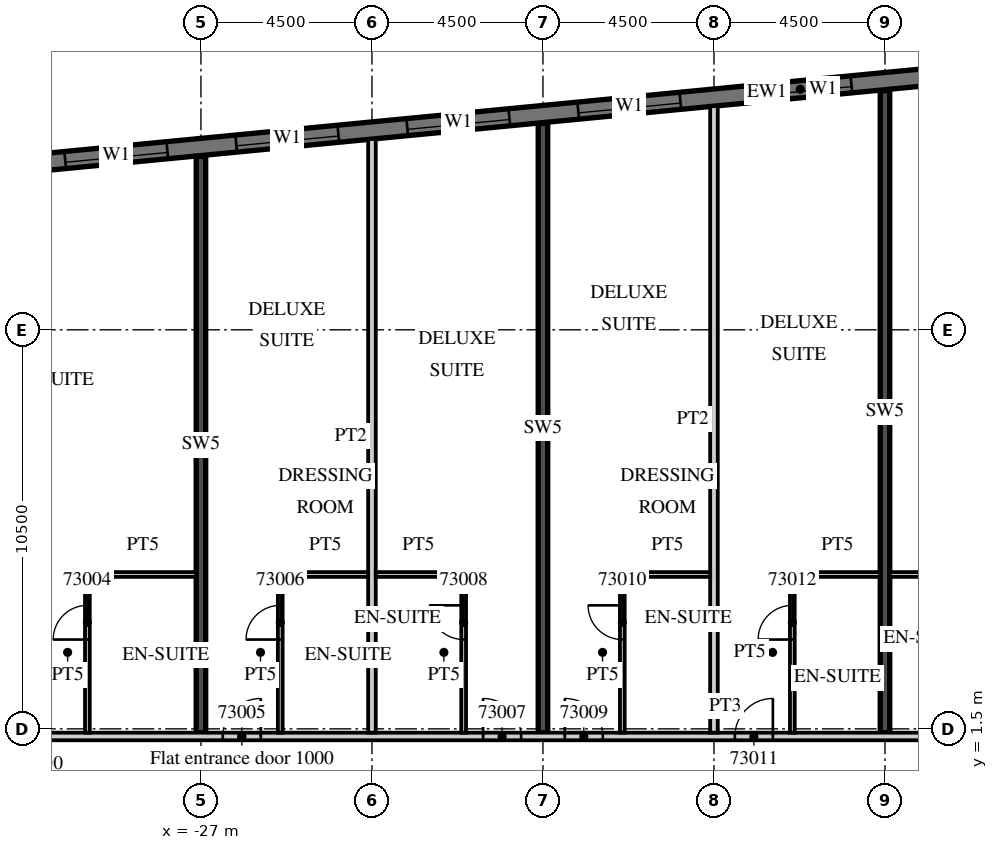
"""IFC4 building model, lengths in metres.
Left out: names, types, materials, properties, quantities, classifications, styles, units other than length and angle.
Written with IfcOpenShell. Run it as: python <this file> out.ifc"""

import sys

from ifc_helpers import new_model, si_unit, direction, frame, frame_2d, origin, place, context, subcontext, project, spatial, rectangle, extrude, element, fill, save


model = new_model("IFC4")
c1 = context("Model", 3, precision=1e-05, world=origin(), true_north=direction((0.0, 1.0)))
c2 = subcontext(c1, "Body", "Model", "MODEL_VIEW")
j1 = project(units=[si_unit("LENGTHUNIT", "METRE"), si_unit("PLANEANGLEUNIT", "RADIAN")], contexts=[c1])
p1 = place(None, origin())
s1 = spatial("IfcSite", under=j1, at=p1, CompositionType="ELEMENT")
p2 = place(p1, origin())
s2 = spatial("IfcBuilding", under=s1, at=p2, CompositionType="ELEMENT")
p3 = place(p2, frame((0.0, 0.0, 291.6)))
s3 = spatial("IfcBuildingStorey", under=s2, at=p3, CompositionType="ELEMENT", Elevation=291.6)
p4 = place(p3, frame((-27.0, 1.4, 0.0), z_axis=(0.0, 0.0, 1.0), x_axis=(0.0, 1.0, 0.0)))
e1 = element("IfcWall", 1, at=p4, inside=s3, PredefinedType="SHEAR", context=c2, shape_type="SweptSolid", body=[
    extrude(rectangle(XDim=15.163, YDim=0.25, at=frame_2d((7.582, 0.0))), origin(), (0.0, 0.0, 1.0), 3.3),
])
p5 = place(p3, frame((-18.0, 1.4, 0.0), z_axis=(0.0, 0.0, 1.0), x_axis=(0.0, 1.0, 0.0)))
e2 = element("IfcWall", 2, at=p5, inside=s3, PredefinedType="SHEAR", context=c2, shape_type="SweptSolid", body=[
    extrude(rectangle(XDim=16.03, YDim=0.25, at=frame_2d((8.015, 0.0))), origin(), (0.0, 0.0, 1.0), 3.3),
])
p6 = place(p3, frame((-9.0, 1.4, 0.0), z_axis=(0.0, 0.0, 1.0), x_axis=(0.0, 1.0, 0.0)))
e3 = element("IfcWall", 3, at=p6, inside=s3, PredefinedType="SHEAR", context=c2, shape_type="SweptSolid", body=[
    extrude(rectangle(XDim=16.896, YDim=0.25, at=frame_2d((8.448, 0.0))), origin(), (0.0, 0.0, 1.0), 3.3),
])
p7 = place(p3, frame((13.521, 20.713, 0.0), z_axis=(0.0, 0.0, 1.0), x_axis=(-0.995396277313, -0.095844932638, 0.0)))
e4 = element("IfcWall", 4, at=p7, inside=s3, PredefinedType="SOLIDWALL", context=c2, shape_type="SweptSolid", body=[
    extrude(rectangle(XDim=51.495, YDim=0.45, at=frame_2d((25.748, 0.0))), origin(), (0.0, 0.0, 1.0), 3.02),
])
p8 = place(p7, frame((0.91, 0.0, 0.45)))
e5 = element("IfcOpeningElement", 5, at=p8, cuts=e4, PredefinedType="OPENING", context=c2, shape_type="SweptSolid", body=[
    extrude(rectangle(XDim=2.7, YDim=2.25, at=frame_2d((1.35, 1.125))), frame((0.0, 0.235, 0.0), z_axis=(0.0, -1.0, 0.0), x_axis=(1.0, 0.0, 0.0)), (0.0, 0.0, 1.0), 0.47),
])
p9 = place(p7, frame((5.431, 0.0, 0.45)))
e6 = element("IfcOpeningElement", 6, at=p9, cuts=e4, PredefinedType="OPENING", context=c2, shape_type="SweptSolid", body=[
    extrude(rectangle(XDim=2.7, YDim=2.25, at=frame_2d((1.35, 1.125))), frame((0.0, 0.235, 0.0), z_axis=(0.0, -1.0, 0.0), x_axis=(1.0, 0.0, 0.0)), (0.0, 0.0, 1.0), 0.47),
])
p10 = place(p7, frame((9.952, 0.0, 0.45)))
e7 = element("IfcOpeningElement", 7, at=p10, cuts=e4, PredefinedType="OPENING", context=c2, shape_type="SweptSolid", body=[
    extrude(rectangle(XDim=2.7, YDim=2.25, at=frame_2d((1.35, 1.125))), frame((0.0, 0.235, 0.0), z_axis=(0.0, -1.0, 0.0), x_axis=(1.0, 0.0, 0.0)), (0.0, 0.0, 1.0), 0.47),
])
p11 = place(p7, frame((14.473, 0.0, 0.45)))
e8 = element("IfcOpeningElement", 8, at=p11, cuts=e4, PredefinedType="OPENING", context=c2, shape_type="SweptSolid", body=[
    extrude(rectangle(XDim=2.7, YDim=2.25, at=frame_2d((1.35, 1.125))), frame((0.0, 0.235, 0.0), z_axis=(0.0, -1.0, 0.0), x_axis=(1.0, 0.0, 0.0)), (0.0, 0.0, 1.0), 0.47),
])
p12 = place(p7, frame((18.994, 0.0, 0.45)))
e9 = element("IfcOpeningElement", 9, at=p12, cuts=e4, PredefinedType="OPENING", context=c2, shape_type="SweptSolid", body=[
    extrude(rectangle(XDim=2.7, YDim=2.25, at=frame_2d((1.35, 1.125))), frame((0.0, 0.235, 0.0), z_axis=(0.0, -1.0, 0.0), x_axis=(1.0, 0.0, 0.0)), (0.0, 0.0, 1.0), 0.47),
])
p13 = place(p7, frame((23.514, 0.0, 0.45)))
e10 = element("IfcOpeningElement", 10, at=p13, cuts=e4, PredefinedType="OPENING", context=c2, shape_type="SweptSolid", body=[
    extrude(rectangle(XDim=2.7, YDim=2.25, at=frame_2d((1.35, 1.125))), frame((0.0, 0.235, 0.0), z_axis=(0.0, -1.0, 0.0), x_axis=(1.0, 0.0, 0.0)), (0.0, 0.0, 1.0), 0.47),
])
p14 = place(p7, frame((28.035, 0.0, 0.45)))
e11 = element("IfcOpeningElement", 11, at=p14, cuts=e4, PredefinedType="OPENING", context=c2, shape_type="SweptSolid", body=[
    extrude(rectangle(XDim=2.7, YDim=2.25, at=frame_2d((1.35, 1.125))), frame((0.0, 0.235, 0.0), z_axis=(0.0, -1.0, 0.0), x_axis=(1.0, 0.0, 0.0)), (0.0, 0.0, 1.0), 0.47),
])
p15 = place(p7, frame((32.556, 0.0, 0.45)))
e12 = element("IfcOpeningElement", 12, at=p15, cuts=e4, PredefinedType="OPENING", context=c2, shape_type="SweptSolid", body=[
    extrude(rectangle(XDim=2.7, YDim=2.25, at=frame_2d((1.35, 1.125))), frame((0.0, 0.235, 0.0), z_axis=(0.0, -1.0, 0.0), x_axis=(1.0, 0.0, 0.0)), (0.0, 0.0, 1.0), 0.47),
])
p16 = place(p7, frame((37.077, 0.0, 0.45)))
e13 = element("IfcOpeningElement", 13, at=p16, cuts=e4, PredefinedType="OPENING", context=c2, shape_type="SweptSolid", body=[
    extrude(rectangle(XDim=2.7, YDim=2.25, at=frame_2d((1.35, 1.125))), frame((0.0, 0.235, 0.0), z_axis=(0.0, -1.0, 0.0), x_axis=(1.0, 0.0, 0.0)), (0.0, 0.0, 1.0), 0.47),
])
p17 = place(p7, frame((41.598, 0.0, 0.45)))
e14 = element("IfcOpeningElement", 14, at=p17, cuts=e4, PredefinedType="OPENING", context=c2, shape_type="SweptSolid", body=[
    extrude(rectangle(XDim=2.7, YDim=2.25, at=frame_2d((1.35, 1.125))), frame((0.0, 0.235, 0.0), z_axis=(0.0, -1.0, 0.0), x_axis=(1.0, 0.0, 0.0)), (0.0, 0.0, 1.0), 0.47),
])
p18 = place(p7, frame((46.118, 0.0, 0.45)))
e15 = element("IfcOpeningElement", 15, at=p18, cuts=e4, PredefinedType="OPENING", context=c2, shape_type="SweptSolid", body=[
    extrude(rectangle(XDim=2.7, YDim=2.25, at=frame_2d((1.35, 1.125))), frame((0.0, 0.235, 0.0), z_axis=(0.0, -1.0, 0.0), x_axis=(1.0, 0.0, 0.0)), (0.0, 0.0, 1.0), 0.47),
])
p19 = place(p3, frame((-39.909, 1.3, 0.0), z_axis=(0.0, 0.0, 1.0), x_axis=(1.0, 0.0, 0.0)))
e16 = element("IfcWall", 16, at=p19, inside=s3, PredefinedType="PARTITIONING", context=c2, shape_type="SweptSolid", body=[
    extrude(rectangle(XDim=53.409, YDim=0.2, at=frame_2d((26.705, 0.0))), origin(), (0.0, 0.0, 1.0), 3.02),
])
p20 = place(p19, frame((0.255, 0.0, 0.0)))
e17 = element("IfcOpeningElement", 17, at=p20, cuts=e16, PredefinedType="OPENING", context=c2, shape_type="SweptSolid", body=[
    extrude(rectangle(XDim=0.9, YDim=2.1, at=frame_2d((0.45, 1.05))), frame((0.0, 0.11, 0.0), z_axis=(0.0, -1.0, 0.0), x_axis=(1.0, 0.0, 0.0)), (0.0, 0.0, 1.0), 0.22),
])
p21 = place(p19, frame((6.347, 0.0, 0.0)))
e18 = element("IfcOpeningElement", 18, at=p21, cuts=e16, PredefinedType="OPENING", context=c2, shape_type="SweptSolid", body=[
    extrude(rectangle(XDim=1.2, YDim=2.1, at=frame_2d((0.6, 1.05))), frame((0.0, 0.11, 0.0), z_axis=(0.0, -1.0, 0.0), x_axis=(1.0, 0.0, 0.0)), (0.0, 0.0, 1.0), 0.22),
])
p22 = place(p19, frame((13.484, 0.0, 0.0)))
e19 = element("IfcOpeningElement", 19, at=p22, cuts=e16, PredefinedType="OPENING", context=c2, shape_type="SweptSolid", body=[
    extrude(rectangle(XDim=1.0, YDim=2.1, at=frame_2d((0.5, 1.05))), frame((0.0, 0.11, 0.0), z_axis=(0.0, -1.0, 0.0), x_axis=(1.0, 0.0, 0.0)), (0.0, 0.0, 1.0), 0.22),
])
p23 = place(p19, frame((20.334, 0.0, 0.0)))
e20 = element("IfcOpeningElement", 20, at=p23, cuts=e16, PredefinedType="OPENING", context=c2, shape_type="SweptSolid", body=[
    extrude(rectangle(XDim=1.0, YDim=2.1, at=frame_2d((0.5, 1.05))), frame((0.0, 0.11, 0.0), z_axis=(0.0, -1.0, 0.0), x_axis=(1.0, 0.0, 0.0)), (0.0, 0.0, 1.0), 0.22),
])
p24 = place(p19, frame((22.484, 0.0, 0.0)))
e21 = element("IfcOpeningElement", 21, at=p24, cuts=e16, PredefinedType="OPENING", context=c2, shape_type="SweptSolid", body=[
    extrude(rectangle(XDim=1.0, YDim=2.1, at=frame_2d((0.5, 1.05))), frame((0.0, 0.11, 0.0), z_axis=(0.0, -1.0, 0.0), x_axis=(1.0, 0.0, 0.0)), (0.0, 0.0, 1.0), 0.22),
])
p25 = place(p19, frame((26.959, 0.0, 0.0)))
e22 = element("IfcOpeningElement", 22, at=p25, cuts=e16, PredefinedType="OPENING", context=c2, shape_type="SweptSolid", body=[
    extrude(rectangle(XDim=1.0, YDim=2.1, at=frame_2d((0.5, 1.05))), frame((0.0, 0.11, 0.0), z_axis=(0.0, -1.0, 0.0), x_axis=(1.0, 0.0, 0.0)), (0.0, 0.0, 1.0), 0.22),
])
p26 = place(p19, frame((36.271, 0.0, 0.0)))
e23 = element("IfcOpeningElement", 23, at=p26, cuts=e16, PredefinedType="OPENING", context=c2, shape_type="SweptSolid", body=[
    extrude(rectangle(XDim=1.2, YDim=2.1, at=frame_2d((0.6, 1.05))), frame((0.0, 0.11, 0.0), z_axis=(0.0, -1.0, 0.0), x_axis=(1.0, 0.0, 0.0)), (0.0, 0.0, 1.0), 0.22),
])
p27 = place(p19, frame((40.484, 0.0, 0.0)))
e24 = element("IfcOpeningElement", 24, at=p27, cuts=e16, PredefinedType="OPENING", context=c2, shape_type="SweptSolid", body=[
    extrude(rectangle(XDim=1.0, YDim=2.1, at=frame_2d((0.5, 1.05))), frame((0.0, 0.11, 0.0), z_axis=(0.0, -1.0, 0.0), x_axis=(1.0, 0.0, 0.0)), (0.0, 0.0, 1.0), 0.22),
])
p28 = place(p19, frame((44.959, 0.0, 0.0)))
e25 = element("IfcOpeningElement", 25, at=p28, cuts=e16, PredefinedType="OPENING", context=c2, shape_type="SweptSolid", body=[
    extrude(rectangle(XDim=1.0, YDim=2.1, at=frame_2d((0.5, 1.05))), frame((0.0, 0.11, 0.0), z_axis=(0.0, -1.0, 0.0), x_axis=(1.0, 0.0, 0.0)), (0.0, 0.0, 1.0), 0.22),
])
p29 = place(p19, frame((51.834, 0.0, 0.0)))
e26 = element("IfcOpeningElement", 26, at=p29, cuts=e16, PredefinedType="OPENING", context=c2, shape_type="SweptSolid", body=[
    extrude(rectangle(XDim=1.0, YDim=2.1, at=frame_2d((0.5, 1.05))), frame((0.0, 0.11, 0.0), z_axis=(0.0, -1.0, 0.0), x_axis=(1.0, 0.0, 0.0)), (0.0, 0.0, 1.0), 0.22),
])
p30 = place(p3, frame((-29.988, 1.4, 0.0), z_axis=(0.0, 0.0, 1.0), x_axis=(0.0, 1.0, 0.0)))
e27 = element("IfcWall", 27, at=p30, inside=s3, PredefinedType="PARTITIONING", context=c2, shape_type="SweptSolid", body=[
    extrude(rectangle(XDim=4.225, YDim=0.125, at=frame_2d((2.113, 0.0))), origin(), (0.0, 0.0, 1.0), 3.02),
])
p31 = place(p30, frame((2.45, 0.0, 0.0)))
e28 = element("IfcOpeningElement", 28, at=p31, cuts=e27, PredefinedType="OPENING", context=c2, shape_type="SweptSolid", body=[
    extrude(rectangle(XDim=0.9, YDim=2.1, at=frame_2d((0.45, 1.05))), frame((0.0, 0.073, 0.0), z_axis=(0.0, -1.0, 0.0), x_axis=(1.0, 0.0, 0.0)), (0.0, 0.0, 1.0), 0.145),
])
p32 = place(p3, frame((-29.925, 5.562, 0.0), z_axis=(0.0, 0.0, 1.0), x_axis=(1.0, 0.0, 0.0)))
e29 = element("IfcWall", 29, at=p32, inside=s3, PredefinedType="PARTITIONING", context=c2, shape_type="SweptSolid", body=[
    extrude(rectangle(XDim=2.8, YDim=0.125, at=frame_2d((1.4, 0.0))), origin(), (0.0, 0.0, 1.0), 3.02),
])
p33 = place(p3, frame((-22.5, 1.4, 0.0), z_axis=(0.0, 0.0, 1.0), x_axis=(0.0, 1.0, 0.0)))
e30 = element("IfcWall", 30, at=p33, inside=s3, PredefinedType="PARTITIONING", context=c2, shape_type="SweptSolid", body=[
    extrude(rectangle(XDim=15.618, YDim=0.2, at=frame_2d((7.809, 0.0))), origin(), (0.0, 0.0, 1.0), 3.02),
])
p34 = place(p3, frame((-24.913, 1.4, 0.0), z_axis=(0.0, 0.0, 1.0), x_axis=(0.0, 1.0, 0.0)))
e31 = element("IfcWall", 31, at=p34, inside=s3, PredefinedType="PARTITIONING", context=c2, shape_type="SweptSolid", body=[
    extrude(rectangle(XDim=4.225, YDim=0.125, at=frame_2d((2.113, 0.0))), origin(), (0.0, 0.0, 1.0), 3.02),
])
p35 = place(p34, frame((2.45, 0.0, 0.0)))
e32 = element("IfcOpeningElement", 32, at=p35, cuts=e31, PredefinedType="OPENING", context=c2, shape_type="SweptSolid", body=[
    extrude(rectangle(XDim=0.9, YDim=2.1, at=frame_2d((0.45, 1.05))), frame((0.0, 0.073, 0.0), z_axis=(0.0, -1.0, 0.0), x_axis=(1.0, 0.0, 0.0)), (0.0, 0.0, 1.0), 0.145),
])
p36 = place(p3, frame((-24.85, 5.562, 0.0), z_axis=(0.0, 0.0, 1.0), x_axis=(1.0, 0.0, 0.0)))
e33 = element("IfcWall", 33, at=p36, inside=s3, PredefinedType="PARTITIONING", context=c2, shape_type="SweptSolid", body=[
    extrude(rectangle(XDim=2.25, YDim=0.125, at=frame_2d((1.125, 0.0))), origin(), (0.0, 0.0, 1.0), 3.02),
])
p37 = place(p3, frame((-20.087, 1.4, 0.0), z_axis=(0.0, 0.0, 1.0), x_axis=(0.0, 1.0, 0.0)))
e34 = element("IfcWall", 34, at=p37, inside=s3, PredefinedType="PARTITIONING", context=c2, shape_type="SweptSolid", body=[
    extrude(rectangle(XDim=4.225, YDim=0.125, at=frame_2d((2.113, 0.0))), origin(), (0.0, 0.0, 1.0), 3.02),
])
p38 = place(p37, frame((2.45, 0.0, 0.0)))
e35 = element("IfcOpeningElement", 35, at=p38, cuts=e34, PredefinedType="OPENING", context=c2, shape_type="SweptSolid", body=[
    extrude(rectangle(XDim=0.9, YDim=2.1, at=frame_2d((0.45, 1.05))), frame((0.0, 0.073, 0.0), z_axis=(0.0, -1.0, 0.0), x_axis=(1.0, 0.0, 0.0)), (0.0, 0.0, 1.0), 0.145),
])
p39 = place(p3, frame((-22.4, 5.562, 0.0), z_axis=(0.0, 0.0, 1.0), x_axis=(1.0, 0.0, 0.0)))
e36 = element("IfcWall", 36, at=p39, inside=s3, PredefinedType="PARTITIONING", context=c2, shape_type="SweptSolid", body=[
    extrude(rectangle(XDim=2.25, YDim=0.125, at=frame_2d((1.125, 0.0))), origin(), (0.0, 0.0, 1.0), 3.02),
])
p40 = place(p3, frame((-13.5, 1.4, 0.0), z_axis=(0.0, 0.0, 1.0), x_axis=(0.0, 1.0, 0.0)))
e37 = element("IfcWall", 37, at=p40, inside=s3, PredefinedType="PARTITIONING", context=c2, shape_type="SweptSolid", body=[
    extrude(rectangle(XDim=16.485, YDim=0.2, at=frame_2d((8.243, 0.0))), origin(), (0.0, 0.0, 1.0), 3.02),
])
p41 = place(p3, frame((-15.912, 1.4, 0.0), z_axis=(0.0, 0.0, 1.0), x_axis=(0.0, 1.0, 0.0)))
e38 = element("IfcWall", 38, at=p41, inside=s3, PredefinedType="PARTITIONING", context=c2, shape_type="SweptSolid", body=[
    extrude(rectangle(XDim=4.225, YDim=0.125, at=frame_2d((2.113, 0.0))), origin(), (0.0, 0.0, 1.0), 3.02),
])
p42 = place(p41, frame((2.45, 0.0, 0.0)))
e39 = element("IfcOpeningElement", 39, at=p42, cuts=e38, PredefinedType="OPENING", context=c2, shape_type="SweptSolid", body=[
    extrude(rectangle(XDim=0.9, YDim=2.1, at=frame_2d((0.45, 1.05))), frame((0.0, 0.073, 0.0), z_axis=(0.0, -1.0, 0.0), x_axis=(1.0, 0.0, 0.0)), (0.0, 0.0, 1.0), 0.145),
])
p43 = place(p3, frame((-15.85, 5.562, 0.0), z_axis=(0.0, 0.0, 1.0), x_axis=(1.0, 0.0, 0.0)))
e40 = element("IfcWall", 40, at=p43, inside=s3, PredefinedType="PARTITIONING", context=c2, shape_type="SweptSolid", body=[
    extrude(rectangle(XDim=2.25, YDim=0.125, at=frame_2d((1.125, 0.0))), origin(), (0.0, 0.0, 1.0), 3.02),
])
p44 = place(p3, frame((-11.438, 1.4, 0.0), z_axis=(0.0, 0.0, 1.0), x_axis=(0.0, 1.0, 0.0)))
e41 = element("IfcWall", 41, at=p44, inside=s3, PredefinedType="PARTITIONING", context=c2, shape_type="SweptSolid", body=[
    extrude(rectangle(XDim=4.225, YDim=0.125, at=frame_2d((2.113, 0.0))), origin(), (0.0, 0.0, 1.0), 3.02),
])
p45 = place(p44, frame((2.45, 0.0, 0.0)))
e42 = element("IfcOpeningElement", 42, at=p45, cuts=e41, PredefinedType="OPENING", context=c2, shape_type="SweptSolid", body=[
    extrude(rectangle(XDim=0.9, YDim=2.1, at=frame_2d((0.45, 1.05))), frame((0.0, 0.073, 0.0), z_axis=(0.0, -1.0, 0.0), x_axis=(1.0, 0.0, 0.0)), (0.0, 0.0, 1.0), 0.145),
])
p46 = place(p3, frame((-11.375, 5.562, 0.0), z_axis=(0.0, 0.0, 1.0), x_axis=(1.0, 0.0, 0.0)))
e43 = element("IfcWall", 43, at=p46, inside=s3, PredefinedType="PARTITIONING", context=c2, shape_type="SweptSolid", body=[
    extrude(rectangle(XDim=2.25, YDim=0.125, at=frame_2d((1.125, 0.0))), origin(), (0.0, 0.0, 1.0), 3.02),
])
p47 = place(p3, frame((-8.875, 5.562, 0.0), z_axis=(0.0, 0.0, 1.0), x_axis=(1.0, 0.0, 0.0)))
e44 = element("IfcWall", 44, at=p47, inside=s3, PredefinedType="PARTITIONING", context=c2, shape_type="SweptSolid", body=[
    extrude(rectangle(XDim=2.8, YDim=0.125, at=frame_2d((1.4, 0.0))), origin(), (0.0, 0.0, 1.0), 3.02),
])
p48 = place(p13, origin())
e45 = element("IfcWindow", 45, at=p48, inside=s3, PartitioningType="SINGLE_PANEL", PredefinedType="WINDOW", context=c2, shape_type="SweptSolid", body=[
    extrude(rectangle(XDim=2.7, YDim=2.25, at=frame_2d((1.35, 1.125))), frame((0.0, 0.09, 0.0), z_axis=(0.0, -1.0, 0.0), x_axis=(1.0, 0.0, 0.0)), (0.0, 0.0, 1.0), 0.06),
])
fill(e10, e45)
p49 = place(p14, origin())
e46 = element("IfcWindow", 46, at=p49, inside=s3, PartitioningType="SINGLE_PANEL", PredefinedType="WINDOW", context=c2, shape_type="SweptSolid", body=[
    extrude(rectangle(XDim=2.7, YDim=2.25, at=frame_2d((1.35, 1.125))), frame((0.0, 0.09, 0.0), z_axis=(0.0, -1.0, 0.0), x_axis=(1.0, 0.0, 0.0)), (0.0, 0.0, 1.0), 0.06),
])
fill(e11, e46)
p50 = place(p15, origin())
e47 = element("IfcWindow", 47, at=p50, inside=s3, PartitioningType="SINGLE_PANEL", PredefinedType="WINDOW", context=c2, shape_type="SweptSolid", body=[
    extrude(rectangle(XDim=2.7, YDim=2.25, at=frame_2d((1.35, 1.125))), frame((0.0, 0.09, 0.0), z_axis=(0.0, -1.0, 0.0), x_axis=(1.0, 0.0, 0.0)), (0.0, 0.0, 1.0), 0.06),
])
fill(e12, e47)
p51 = place(p16, origin())
e48 = element("IfcWindow", 48, at=p51, inside=s3, PartitioningType="SINGLE_PANEL", PredefinedType="WINDOW", context=c2, shape_type="SweptSolid", body=[
    extrude(rectangle(XDim=2.7, YDim=2.25, at=frame_2d((1.35, 1.125))), frame((0.0, 0.09, 0.0), z_axis=(0.0, -1.0, 0.0), x_axis=(1.0, 0.0, 0.0)), (0.0, 0.0, 1.0), 0.06),
])
fill(e13, e48)
p52 = place(p17, origin())
e49 = element("IfcWindow", 49, at=p52, inside=s3, PartitioningType="SINGLE_PANEL", PredefinedType="WINDOW", context=c2, shape_type="SweptSolid", body=[
    extrude(rectangle(XDim=2.7, YDim=2.25, at=frame_2d((1.35, 1.125))), frame((0.0, 0.09, 0.0), z_axis=(0.0, -1.0, 0.0), x_axis=(1.0, 0.0, 0.0)), (0.0, 0.0, 1.0), 0.06),
])
fill(e14, e49)
p53 = place(p31, origin())
e50 = element("IfcDoor", 50, at=p53, inside=s3, OperationType="SINGLE_SWING_LEFT", PredefinedType="DOOR", context=c2, shape_type="SweptSolid", body=[
    extrude(rectangle(XDim=0.9, YDim=2.1, at=frame_2d((0.45, 1.05))), frame((0.0, 0.025, 0.0), z_axis=(0.0, -1.0, 0.0), x_axis=(1.0, 0.0, 0.0)), (0.0, 0.0, 1.0), 0.05),
])
fill(e28, e50)
p54 = place(p22, origin())
e51 = element("IfcDoor", 51, at=p54, inside=s3, OperationType="SINGLE_SWING_RIGHT", PredefinedType="DOOR", context=c2, shape_type="SweptSolid", body=[
    extrude(rectangle(XDim=1.0, YDim=2.1, at=frame_2d((0.5, 1.05))), frame((0.0, 0.025, 0.0), z_axis=(0.0, -1.0, 0.0), x_axis=(1.0, 0.0, 0.0)), (0.0, 0.0, 1.0), 0.05),
])
fill(e19, e51)
p55 = place(p35, origin())
e52 = element("IfcDoor", 52, at=p55, inside=s3, OperationType="SINGLE_SWING_LEFT", PredefinedType="DOOR", context=c2, shape_type="SweptSolid", body=[
    extrude(rectangle(XDim=0.9, YDim=2.1, at=frame_2d((0.45, 1.05))), frame((0.0, 0.025, 0.0), z_axis=(0.0, -1.0, 0.0), x_axis=(1.0, 0.0, 0.0)), (0.0, 0.0, 1.0), 0.05),
])
fill(e32, e52)
p56 = place(p23, origin())
e53 = element("IfcDoor", 53, at=p56, inside=s3, OperationType="SINGLE_SWING_LEFT", PredefinedType="DOOR", context=c2, shape_type="SweptSolid", body=[
    extrude(rectangle(XDim=1.0, YDim=2.1, at=frame_2d((0.5, 1.05))), frame((0.0, 0.025, 0.0), z_axis=(0.0, -1.0, 0.0), x_axis=(1.0, 0.0, 0.0)), (0.0, 0.0, 1.0), 0.05),
])
fill(e20, e53)
p57 = place(p38, origin())
e54 = element("IfcDoor", 54, at=p57, inside=s3, OperationType="SINGLE_SWING_RIGHT", PredefinedType="DOOR", context=c2, shape_type="SweptSolid", body=[
    extrude(rectangle(XDim=0.9, YDim=2.1, at=frame_2d((0.45, 1.05))), frame((0.0, 0.025, 0.0), z_axis=(0.0, -1.0, 0.0), x_axis=(1.0, 0.0, 0.0)), (0.0, 0.0, 1.0), 0.05),
])
fill(e35, e54)
p58 = place(p24, origin())
e55 = element("IfcDoor", 55, at=p58, inside=s3, OperationType="SINGLE_SWING_LEFT", PredefinedType="DOOR", context=c2, shape_type="SweptSolid", body=[
    extrude(rectangle(XDim=1.0, YDim=2.1, at=frame_2d((0.5, 1.05))), frame((0.0, 0.025, 0.0), z_axis=(0.0, -1.0, 0.0), x_axis=(1.0, 0.0, 0.0)), (0.0, 0.0, 1.0), 0.05),
])
fill(e21, e55)
p59 = place(p42, origin())
e56 = element("IfcDoor", 56, at=p59, inside=s3, OperationType="SINGLE_SWING_RIGHT", PredefinedType="DOOR", context=c2, shape_type="SweptSolid", body=[
    extrude(rectangle(XDim=0.9, YDim=2.1, at=frame_2d((0.45, 1.05))), frame((0.0, 0.025, 0.0), z_axis=(0.0, -1.0, 0.0), x_axis=(1.0, 0.0, 0.0)), (0.0, 0.0, 1.0), 0.05),
])
fill(e39, e56)
p60 = place(p25, origin())
e57 = element("IfcDoor", 57, at=p60, inside=s3, OperationType="SINGLE_SWING_RIGHT", PredefinedType="DOOR", context=c2, shape_type="SweptSolid", body=[
    extrude(rectangle(XDim=1.0, YDim=2.1, at=frame_2d((0.5, 1.05))), frame((0.0, 0.025, 0.0), z_axis=(0.0, -1.0, 0.0), x_axis=(1.0, 0.0, 0.0)), (0.0, 0.0, 1.0), 0.05),
])
fill(e22, e57)
p61 = place(p45, origin())
e58 = element("IfcDoor", 58, at=p61, inside=s3, OperationType="SINGLE_SWING_LEFT", PredefinedType="DOOR", context=c2, shape_type="SweptSolid", body=[
    extrude(rectangle(XDim=0.9, YDim=2.1, at=frame_2d((0.45, 1.05))), frame((0.0, 0.025, 0.0), z_axis=(0.0, -1.0, 0.0), x_axis=(1.0, 0.0, 0.0)), (0.0, 0.0, 1.0), 0.05),
])
fill(e42, e58)
save(model, sys.argv[1])
